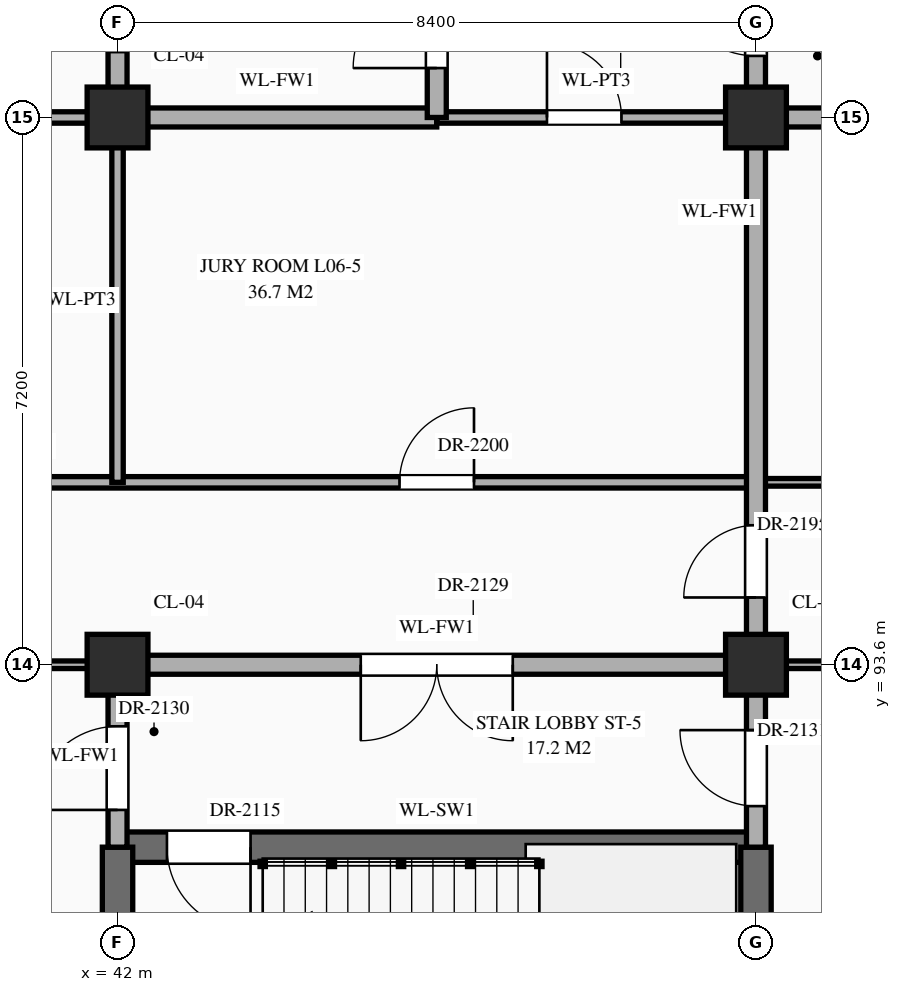
"""IFC4 building model, lengths in metres.
Left out: names, types, materials, properties, quantities, classifications, styles, units other than length and angle.
Written with IfcOpenShell. Run it as: python <this file> out.ifc"""

import sys

from ifc_helpers import new_model, si_unit, direction, frame, frame_2d, origin, origin_2d, place, context, subcontext, project, spatial, rectangle, extrude, element, fill, save


model = new_model("IFC4")
c1 = context("Model", 3, precision=1e-05, world=origin(), true_north=direction((0.0, 1.0)))
c2 = subcontext(c1, "Body", "Model", "MODEL_VIEW")
j1 = project(units=[si_unit("LENGTHUNIT", "METRE"), si_unit("PLANEANGLEUNIT", "RADIAN")], contexts=[c1])
p1 = place(None, origin())
s1 = spatial("IfcSite", under=j1, at=p1, CompositionType="ELEMENT")
p2 = place(p1, origin())
s2 = spatial("IfcBuilding", under=s1, at=p2, CompositionType="ELEMENT")
p3 = place(p2, frame((0.0, 0.0, 26.1)))
s3 = spatial("IfcBuildingStorey", under=s2, at=p3, CompositionType="ELEMENT", Elevation=26.1)
for number, where, z_axis, x_axis in (
    (1, (42.0, 93.6, 0.0), (0.0, 0.0, 1.0), (1.0, 0.0, 0.0)),
    (2, (42.0, 100.8, 0.0), (0.0, 0.0, 1.0), (1.0, 0.0, 0.0)),
    (3, (50.4, 93.6, 0.0), (0.0, 0.0, 1.0), (1.0, 0.0, 0.0)),
    (4, (50.4, 100.8, 0.0), (0.0, 0.0, 1.0), (1.0, 0.0, 0.0)),
):
    element("IfcColumn", number, at=place(p3, frame(where, z_axis=z_axis, x_axis=x_axis)), inside=s3, PredefinedType="COLUMN", context=c2, shape_type="SweptSolid", body=[
        extrude(rectangle(XDim=0.8, YDim=0.8, at=origin_2d()), origin(), (0.0, 0.0, 1.0), 4.5),
    ])
p4 = place(p3, frame((42.0, 91.2, 0.0), z_axis=(0.0, 0.0, 1.0), x_axis=(1.0, 0.0, 0.0)))
e5 = element("IfcWall", 5, at=p4, inside=s3, PredefinedType="SHEAR", context=c2, shape_type="SweptSolid", body=[
    extrude(rectangle(XDim=8.4, YDim=0.4, at=frame_2d((4.2, 0.0))), origin(), (0.0, 0.0, 1.0), 4.24),
])
p5 = place(p4, frame((0.65, 0.0, 0.0)))
e6 = element("IfcOpeningElement", 6, at=p5, cuts=e5, PredefinedType="OPENING", context=c2, shape_type="SweptSolid", body=[
    extrude(rectangle(XDim=1.1, YDim=2.2, at=frame_2d((0.55, 1.1))), frame((0.0, 0.212, 0.0), z_axis=(0.0, -1.0, 0.0), x_axis=(1.0, 0.0, 0.0)), (0.0, 0.0, 1.0), 0.424),
])
p6 = place(p3, frame((25.24, 93.6, 0.0), z_axis=(0.0, 0.0, 1.0), x_axis=(1.0, 0.0, 0.0)))
e7 = element("IfcWall", 7, at=p6, inside=s3, PredefinedType="STANDARD", context=c2, shape_type="SweptSolid", body=[
    extrude(rectangle(XDim=16.76, YDim=0.1, at=frame_2d((8.38, 0.0))), origin(), (0.0, 0.0, 1.0), 3.19),
])
p7 = place(p6, frame((1.01, 0.0, 0.0)))
e8 = element("IfcOpeningElement", 8, at=p7, cuts=e7, PredefinedType="OPENING", context=c2, shape_type="SweptSolid", body=[
    extrude(rectangle(XDim=1.02, YDim=2.4, at=frame_2d((0.51, 1.2))), frame((0.0, 0.062, 0.0), z_axis=(0.0, -1.0, 0.0), x_axis=(1.0, 0.0, 0.0)), (0.0, 0.0, 1.0), 0.124),
])
p8 = place(p6, frame((3.26, 0.0, 0.0)))
e9 = element("IfcOpeningElement", 9, at=p8, cuts=e7, PredefinedType="OPENING", context=c2, shape_type="SweptSolid", body=[
    extrude(rectangle(XDim=1.8, YDim=2.5, at=frame_2d((0.9, 1.25))), frame((0.0, 0.062, 0.0), z_axis=(0.0, -1.0, 0.0), x_axis=(1.0, 0.0, 0.0)), (0.0, 0.0, 1.0), 0.124),
])
p9 = place(p6, frame((6.39, 0.0, 0.0)))
e10 = element("IfcOpeningElement", 10, at=p9, cuts=e7, PredefinedType="OPENING", context=c2, shape_type="SweptSolid", body=[
    extrude(rectangle(XDim=1.14, YDim=2.4, at=frame_2d((0.57, 1.2))), frame((0.0, 0.062, 0.0), z_axis=(0.0, -1.0, 0.0), x_axis=(1.0, 0.0, 0.0)), (0.0, 0.0, 1.0), 0.124),
])
p10 = place(p6, frame((11.95, 0.0, 0.0)))
e11 = element("IfcOpeningElement", 11, at=p10, cuts=e7, PredefinedType="OPENING", context=c2, shape_type="SweptSolid", body=[
    extrude(rectangle(XDim=0.9, YDim=2.15, at=frame_2d((0.45, 1.075))), frame((0.0, 0.062, 0.0), z_axis=(0.0, -1.0, 0.0), x_axis=(1.0, 0.0, 0.0)), (0.0, 0.0, 1.0), 0.124),
])
p11 = place(p3, frame((42.0, 93.6, 0.0), z_axis=(0.0, 0.0, 1.0), x_axis=(1.0, 0.0, 0.0)))
e12 = element("IfcWall", 12, at=p11, inside=s3, PredefinedType="STANDARD", context=c2, shape_type="SweptSolid", body=[
    extrude(rectangle(XDim=8.4, YDim=0.25, at=frame_2d((4.2, 0.0))), origin(), (0.0, 0.0, 1.0), 3.39),
])
p12 = place(p11, frame((3.2, 0.0, 0.0)))
e13 = element("IfcOpeningElement", 13, at=p12, cuts=e12, PredefinedType="OPENING", context=c2, shape_type="SweptSolid", body=[
    extrude(rectangle(XDim=2.0, YDim=2.4, at=frame_2d((1.0, 1.2))), frame((0.0, 0.137, 0.0), z_axis=(0.0, -1.0, 0.0), x_axis=(1.0, 0.0, 0.0)), (0.0, 0.0, 1.0), 0.274),
])
p13 = place(p3, frame((50.4, 93.6, 0.0), z_axis=(0.0, 0.0, 1.0), x_axis=(1.0, 0.0, 0.0)))
e14 = element("IfcWall", 14, at=p13, inside=s3, PredefinedType="STANDARD", context=c2, shape_type="SweptSolid", body=[
    extrude(rectangle(XDim=8.4, YDim=0.1, at=frame_2d((4.2, 0.0))), origin(), (0.0, 0.0, 1.0), 3.39),
])
p14 = place(p13, frame((0.98, 0.0, 0.0)))
e15 = element("IfcOpeningElement", 15, at=p14, cuts=e14, PredefinedType="OPENING", context=c2, shape_type="SweptSolid", body=[
    extrude(rectangle(XDim=1.16, YDim=2.3, at=frame_2d((0.58, 1.15))), frame((0.0, 0.062, 0.0), z_axis=(0.0, -1.0, 0.0), x_axis=(1.0, 0.0, 0.0)), (0.0, 0.0, 1.0), 0.124),
])
p15 = place(p13, frame((3.6, 0.0, 0.0)))
e16 = element("IfcOpeningElement", 16, at=p15, cuts=e14, PredefinedType="OPENING", context=c2, shape_type="SweptSolid", body=[
    extrude(rectangle(XDim=1.2, YDim=2.35, at=frame_2d((0.6, 1.175))), frame((0.0, 0.062, 0.0), z_axis=(0.0, -1.0, 0.0), x_axis=(1.0, 0.0, 0.0)), (0.0, 0.0, 1.0), 0.124),
])
p16 = place(p13, frame((6.22, 0.0, 0.0)))
e17 = element("IfcOpeningElement", 17, at=p16, cuts=e14, PredefinedType="OPENING", context=c2, shape_type="SweptSolid", body=[
    extrude(rectangle(XDim=1.24, YDim=2.3, at=frame_2d((0.62, 1.15))), frame((0.0, 0.062, 0.0), z_axis=(0.0, -1.0, 0.0), x_axis=(1.0, 0.0, 0.0)), (0.0, 0.0, 1.0), 0.124),
])
p17 = place(p3, frame((31.0, 96.0, 0.0), z_axis=(0.0, 0.0, 1.0), x_axis=(1.0, 0.0, 0.0)))
e18 = element("IfcWall", 18, at=p17, inside=s3, PredefinedType="STANDARD", context=c2, shape_type="SweptSolid", body=[
    extrude(rectangle(XDim=19.4, YDim=0.15, at=frame_2d((9.7, 0.0))), origin(), (0.0, 0.0, 1.0), 4.24),
])
p18 = place(p17, frame((0.66, 0.0, 0.0)))
e19 = element("IfcOpeningElement", 19, at=p18, cuts=e18, PredefinedType="OPENING", context=c2, shape_type="SweptSolid", body=[
    extrude(rectangle(XDim=1.28, YDim=2.35, at=frame_2d((0.64, 1.175))), frame((0.0, 0.087, 0.0), z_axis=(0.0, -1.0, 0.0), x_axis=(1.0, 0.0, 0.0)), (0.0, 0.0, 1.0), 0.174),
])
p19 = place(p17, frame((6.33, 0.0, 0.0)))
e20 = element("IfcOpeningElement", 20, at=p19, cuts=e18, PredefinedType="OPENING", context=c2, shape_type="SweptSolid", body=[
    extrude(rectangle(XDim=0.94, YDim=2.3, at=frame_2d((0.47, 1.15))), frame((0.0, 0.087, 0.0), z_axis=(0.0, -1.0, 0.0), x_axis=(1.0, 0.0, 0.0)), (0.0, 0.0, 1.0), 0.174),
])
p20 = place(p17, frame((14.71, 0.0, 0.0)))
e21 = element("IfcOpeningElement", 21, at=p20, cuts=e18, PredefinedType="OPENING", context=c2, shape_type="SweptSolid", body=[
    extrude(rectangle(XDim=0.98, YDim=2.35, at=frame_2d((0.49, 1.175))), frame((0.0, 0.087, 0.0), z_axis=(0.0, -1.0, 0.0), x_axis=(1.0, 0.0, 0.0)), (0.0, 0.0, 1.0), 0.174),
])
p21 = place(p3, frame((50.4, 96.0, 0.0), z_axis=(0.0, 0.0, 1.0), x_axis=(1.0, 0.0, 0.0)))
e22 = element("IfcWall", 22, at=p21, inside=s3, PredefinedType="STANDARD", context=c2, shape_type="SweptSolid", body=[
    extrude(rectangle(XDim=5.8, YDim=0.1, at=frame_2d((2.9, 0.0))), origin(), (0.0, 0.0, 1.0), 4.24),
])
p22 = place(p21, frame((1.24, 0.0, 0.0)))
e23 = element("IfcOpeningElement", 23, at=p22, cuts=e22, PredefinedType="OPENING", context=c2, shape_type="SweptSolid", body=[
    extrude(rectangle(XDim=0.92, YDim=2.15, at=frame_2d((0.46, 1.075))), frame((0.0, 0.062, 0.0), z_axis=(0.0, -1.0, 0.0), x_axis=(1.0, 0.0, 0.0)), (0.0, 0.0, 1.0), 0.124),
])
p23 = place(p21, frame((4.12, 0.0, 0.0)))
e24 = element("IfcOpeningElement", 24, at=p23, cuts=e22, PredefinedType="OPENING", context=c2, shape_type="SweptSolid", body=[
    extrude(rectangle(XDim=0.96, YDim=2.2, at=frame_2d((0.48, 1.1))), frame((0.0, 0.062, 0.0), z_axis=(0.0, -1.0, 0.0), x_axis=(1.0, 0.0, 0.0)), (0.0, 0.0, 1.0), 0.124),
])
p24 = place(p3, frame((31.0, 100.8, 0.0), z_axis=(0.0, 0.0, 1.0), x_axis=(1.0, 0.0, 0.0)))
e25 = element("IfcWall", 25, at=p24, inside=s3, PredefinedType="STANDARD", context=c2, shape_type="SweptSolid", body=[
    extrude(rectangle(XDim=11.0, YDim=0.15, at=frame_2d((5.5, 0.0))), origin(), (0.0, 0.0, 1.0), 3.39),
])
p25 = place(p24, frame((0.67, 0.0, 0.0)))
e26 = element("IfcOpeningElement", 26, at=p25, cuts=e25, PredefinedType="OPENING", context=c2, shape_type="SweptSolid", body=[
    extrude(rectangle(XDim=0.94, YDim=2.3, at=frame_2d((0.47, 1.15))), frame((0.0, 0.087, 0.0), z_axis=(0.0, -1.0, 0.0), x_axis=(1.0, 0.0, 0.0)), (0.0, 0.0, 1.0), 0.174),
])
p26 = place(p24, frame((6.31, 0.0, 0.0)))
e27 = element("IfcOpeningElement", 27, at=p26, cuts=e25, PredefinedType="OPENING", context=c2, shape_type="SweptSolid", body=[
    extrude(rectangle(XDim=0.98, YDim=2.35, at=frame_2d((0.49, 1.175))), frame((0.0, 0.087, 0.0), z_axis=(0.0, -1.0, 0.0), x_axis=(1.0, 0.0, 0.0)), (0.0, 0.0, 1.0), 0.174),
])
p27 = place(p3, frame((42.0, 100.8, 0.0), z_axis=(0.0, 0.0, 1.0), x_axis=(1.0, 0.0, 0.0)))
e28 = element("IfcWall", 28, at=p27, inside=s3, PredefinedType="STANDARD", context=c2, shape_type="SweptSolid", body=[
    extrude(rectangle(XDim=4.2, YDim=0.25, at=frame_2d((2.1, 0.0))), origin(), (0.0, 0.0, 1.0), 3.39),
])
p28 = place(p3, frame((46.2, 100.8, 0.0), z_axis=(0.0, 0.0, 1.0), x_axis=(1.0, 0.0, 0.0)))
e29 = element("IfcWall", 29, at=p28, inside=s3, PredefinedType="STANDARD", context=c2, shape_type="SweptSolid", body=[
    extrude(rectangle(XDim=4.2, YDim=0.15, at=frame_2d((2.1, 0.0))), origin(), (0.0, 0.0, 1.0), 3.39),
])
p29 = place(p28, frame((1.45, 0.0, 0.0)))
e30 = element("IfcOpeningElement", 30, at=p29, cuts=e29, PredefinedType="OPENING", context=c2, shape_type="SweptSolid", body=[
    extrude(rectangle(XDim=0.98, YDim=2.35, at=frame_2d((0.49, 1.175))), frame((0.0, 0.087, 0.0), z_axis=(0.0, -1.0, 0.0), x_axis=(1.0, 0.0, 0.0)), (0.0, 0.0, 1.0), 0.174),
])
p30 = place(p3, frame((50.4, 100.8, 0.0), z_axis=(0.0, 0.0, 1.0), x_axis=(1.0, 0.0, 0.0)))
e31 = element("IfcWall", 31, at=p30, inside=s3, PredefinedType="STANDARD", context=c2, shape_type="SweptSolid", body=[
    extrude(rectangle(XDim=3.4, YDim=0.25, at=frame_2d((1.7, 0.0))), origin(), (0.0, 0.0, 1.0), 3.39),
])
p31 = place(p30, frame((1.36, 0.0, 0.0)))
e32 = element("IfcOpeningElement", 32, at=p31, cuts=e31, PredefinedType="OPENING", context=c2, shape_type="SweptSolid", body=[
    extrude(rectangle(XDim=1.0, YDim=2.2, at=frame_2d((0.5, 1.1))), frame((0.0, 0.137, 0.0), z_axis=(0.0, -1.0, 0.0), x_axis=(1.0, 0.0, 0.0)), (0.0, 0.0, 1.0), 0.274),
])
p32 = place(p3, frame((42.0, 86.4, 0.0), z_axis=(0.0, 0.0, 1.0), x_axis=(0.0, 1.0, 0.0)))
e33 = element("IfcWall", 33, at=p32, inside=s3, PredefinedType="SHEAR", context=c2, shape_type="SweptSolid", body=[
    extrude(rectangle(XDim=4.8, YDim=0.4, at=frame_2d((2.4, 0.0))), origin(), (0.0, 0.0, 1.0), 4.24),
])
p33 = place(p3, frame((42.0, 91.2, 0.0), z_axis=(0.0, 0.0, 1.0), x_axis=(0.0, 1.0, 0.0)))
e34 = element("IfcWall", 34, at=p33, inside=s3, PredefinedType="STANDARD", context=c2, shape_type="SweptSolid", body=[
    extrude(rectangle(XDim=2.4, YDim=0.25, at=frame_2d((1.2, 0.0))), origin(), (0.0, 0.0, 1.0), 3.49),
])
p34 = place(p33, frame((0.49, 0.0, 0.0)))
e35 = element("IfcOpeningElement", 35, at=p34, cuts=e34, PredefinedType="OPENING", context=c2, shape_type="SweptSolid", body=[
    extrude(rectangle(XDim=1.1, YDim=2.2, at=frame_2d((0.55, 1.1))), frame((0.0, 0.137, 0.0), z_axis=(0.0, -1.0, 0.0), x_axis=(1.0, 0.0, 0.0)), (0.0, 0.0, 1.0), 0.274),
])
p35 = place(p3, frame((42.0, 96.0, 0.0), z_axis=(0.0, 0.0, 1.0), x_axis=(0.0, 1.0, 0.0)))
e36 = element("IfcWall", 36, at=p35, inside=s3, PredefinedType="STANDARD", context=c2, shape_type="SweptSolid", body=[
    extrude(rectangle(XDim=4.8, YDim=0.15, at=frame_2d((2.4, 0.0))), origin(), (0.0, 0.0, 1.0), 3.49),
])
p36 = place(p3, frame((42.0, 100.8, 0.0), z_axis=(0.0, 0.0, 1.0), x_axis=(0.0, 1.0, 0.0)))
e37 = element("IfcWall", 37, at=p36, inside=s3, PredefinedType="STANDARD", context=c2, shape_type="SweptSolid", body=[
    extrude(rectangle(XDim=3.6, YDim=0.25, at=frame_2d((1.8, 0.0))), origin(), (0.0, 0.0, 1.0), 3.49),
])
p37 = place(p36, frame((0.86, 0.0, 0.0)))
e38 = element("IfcOpeningElement", 38, at=p37, cuts=e37, PredefinedType="OPENING", context=c2, shape_type="SweptSolid", body=[
    extrude(rectangle(XDim=1.0, YDim=2.2, at=frame_2d((0.5, 1.1))), frame((0.0, 0.137, 0.0), z_axis=(0.0, -1.0, 0.0), x_axis=(1.0, 0.0, 0.0)), (0.0, 0.0, 1.0), 0.274),
])
p38 = place(p3, frame((46.2, 100.8, 0.0), z_axis=(0.0, 0.0, 1.0), x_axis=(0.0, 1.0, 0.0)))
e39 = element("IfcWall", 39, at=p38, inside=s3, PredefinedType="STANDARD", context=c2, shape_type="SweptSolid", body=[
    extrude(rectangle(XDim=3.6, YDim=0.25, at=frame_2d((1.8, 0.0))), origin(), (0.0, 0.0, 1.0), 3.89),
])
p39 = place(p38, frame((0.65, 0.0, 0.0)))
e40 = element("IfcOpeningElement", 40, at=p39, cuts=e39, PredefinedType="OPENING", context=c2, shape_type="SweptSolid", body=[
    extrude(rectangle(XDim=1.1, YDim=2.2, at=frame_2d((0.55, 1.1))), frame((0.0, 0.137, 0.0), z_axis=(0.0, -1.0, 0.0), x_axis=(1.0, 0.0, 0.0)), (0.0, 0.0, 1.0), 0.274),
])
p40 = place(p3, frame((50.4, 86.4, 0.0), z_axis=(0.0, 0.0, 1.0), x_axis=(0.0, 1.0, 0.0)))
e41 = element("IfcWall", 41, at=p40, inside=s3, PredefinedType="SHEAR", context=c2, shape_type="SweptSolid", body=[
    extrude(rectangle(XDim=4.8, YDim=0.4, at=frame_2d((2.4, 0.0))), origin(), (0.0, 0.0, 1.0), 4.24),
])
p41 = place(p3, frame((50.4, 91.2, 0.0), z_axis=(0.0, 0.0, 1.0), x_axis=(0.0, 1.0, 0.0)))
e42 = element("IfcWall", 42, at=p41, inside=s3, PredefinedType="STANDARD", context=c2, shape_type="SweptSolid", body=[
    extrude(rectangle(XDim=13.2, YDim=0.25, at=frame_2d((6.6, 0.0))), origin(), (0.0, 0.0, 1.0), 3.49),
])
p42 = place(p41, frame((0.54, 0.0, 0.0)))
e43 = element("IfcOpeningElement", 43, at=p42, cuts=e42, PredefinedType="OPENING", context=c2, shape_type="SweptSolid", body=[
    extrude(rectangle(XDim=1.0, YDim=2.2, at=frame_2d((0.5, 1.1))), frame((0.0, 0.137, 0.0), z_axis=(0.0, -1.0, 0.0), x_axis=(1.0, 0.0, 0.0)), (0.0, 0.0, 1.0), 0.274),
])
p43 = place(p41, frame((10.41, 0.0, 0.0)))
e44 = element("IfcOpeningElement", 44, at=p43, cuts=e42, PredefinedType="OPENING", context=c2, shape_type="SweptSolid", body=[
    extrude(rectangle(XDim=1.1, YDim=2.2, at=frame_2d((0.55, 1.1))), frame((0.0, 0.137, 0.0), z_axis=(0.0, -1.0, 0.0), x_axis=(1.0, 0.0, 0.0)), (0.0, 0.0, 1.0), 0.274),
])
p44 = place(p41, frame((3.285, 0.0, 0.0)))
e45 = element("IfcOpeningElement", 45, at=p44, cuts=e42, PredefinedType="OPENING", context=c2, shape_type="SweptSolid", body=[
    extrude(rectangle(XDim=0.95, YDim=2.15, at=frame_2d((0.475, 1.075))), frame((0.0, 0.137, 0.0), z_axis=(0.0, -1.0, 0.0), x_axis=(1.0, 0.0, 0.0)), (0.0, 0.0, 1.0), 0.274),
])
p45 = place(p5, frame((1.1, 0.0, 0.0), z_axis=(0.0, 0.0, 1.0), x_axis=(-1.0, 0.0, 0.0)))
e46 = element("IfcDoor", 46, at=p45, inside=s3, OperationType="SINGLE_SWING_LEFT", PredefinedType="DOOR", context=c2, shape_type="SweptSolid", body=[
    extrude(rectangle(XDim=1.1, YDim=2.2, at=frame_2d((0.55, 1.1))), frame((0.0, 0.025, 0.0), z_axis=(0.0, -1.0, 0.0), x_axis=(1.0, 0.0, 0.0)), (0.0, 0.0, 1.0), 0.05),
])
fill(e6, e46)
p46 = place(p12, frame((2.0, 0.0, 0.0), z_axis=(0.0, 0.0, 1.0), x_axis=(-1.0, 0.0, 0.0)))
e47 = element("IfcDoor", 47, at=p46, inside=s3, OperationType="DOUBLE_DOOR_SINGLE_SWING", PredefinedType="DOOR", context=c2, shape_type="SweptSolid", body=[
    extrude(rectangle(XDim=2.0, YDim=2.4, at=frame_2d((1.0, 1.2))), frame((0.0, 0.025, 0.0), z_axis=(0.0, -1.0, 0.0), x_axis=(1.0, 0.0, 0.0)), (0.0, 0.0, 1.0), 0.05),
])
fill(e13, e47)
p47 = place(p34, origin())
e48 = element("IfcDoor", 48, at=p47, inside=s3, OperationType="SINGLE_SWING_LEFT", PredefinedType="DOOR", context=c2, shape_type="SweptSolid", body=[
    extrude(rectangle(XDim=1.1, YDim=2.2, at=frame_2d((0.55, 1.1))), frame((0.0, 0.025, 0.0), z_axis=(0.0, -1.0, 0.0), x_axis=(1.0, 0.0, 0.0)), (0.0, 0.0, 1.0), 0.05),
])
fill(e35, e48)
p48 = place(p42, origin())
e49 = element("IfcDoor", 49, at=p48, inside=s3, OperationType="SINGLE_SWING_RIGHT", PredefinedType="DOOR", context=c2, shape_type="SweptSolid", body=[
    extrude(rectangle(XDim=1.0, YDim=2.2, at=frame_2d((0.5, 1.1))), frame((0.0, 0.025, 0.0), z_axis=(0.0, -1.0, 0.0), x_axis=(1.0, 0.0, 0.0)), (0.0, 0.0, 1.0), 0.05),
])
fill(e43, e49)
p49 = place(p39, origin())
e50 = element("IfcDoor", 50, at=p49, inside=s3, OperationType="SINGLE_SWING_LEFT", PredefinedType="DOOR", context=c2, shape_type="SweptSolid", body=[
    extrude(rectangle(XDim=1.1, YDim=2.2, at=frame_2d((0.55, 1.1))), frame((0.0, 0.025, 0.0), z_axis=(0.0, -1.0, 0.0), x_axis=(1.0, 0.0, 0.0)), (0.0, 0.0, 1.0), 0.05),
])
fill(e40, e50)
p50 = place(p43, origin())
e51 = element("IfcDoor", 51, at=p50, inside=s3, OperationType="SINGLE_SWING_RIGHT", PredefinedType="DOOR", context=c2, shape_type="SweptSolid", body=[
    extrude(rectangle(XDim=1.1, YDim=2.2, at=frame_2d((0.55, 1.1))), frame((0.0, 0.025, 0.0), z_axis=(0.0, -1.0, 0.0), x_axis=(1.0, 0.0, 0.0)), (0.0, 0.0, 1.0), 0.05),
])
fill(e44, e51)
p51 = place(p29, origin())
e52 = element("IfcDoor", 52, at=p51, inside=s3, OperationType="SINGLE_SWING_LEFT", PredefinedType="DOOR", context=c2, shape_type="SweptSolid", body=[
    extrude(rectangle(XDim=0.98, YDim=2.35, at=frame_2d((0.49, 1.175))), frame((0.0, 0.025, 0.0), z_axis=(0.0, -1.0, 0.0), x_axis=(1.0, 0.0, 0.0)), (0.0, 0.0, 1.0), 0.05),
])
fill(e30, e52)
p52 = place(p44, origin())
e53 = element("IfcDoor", 53, at=p52, inside=s3, OperationType="SINGLE_SWING_LEFT", PredefinedType="DOOR", context=c2, shape_type="SweptSolid", body=[
    extrude(rectangle(XDim=0.95, YDim=2.15, at=frame_2d((0.475, 1.075))), frame((0.0, 0.025, 0.0), z_axis=(0.0, -1.0, 0.0), x_axis=(1.0, 0.0, 0.0)), (0.0, 0.0, 1.0), 0.05),
])
fill(e45, e53)
p53 = place(p20, origin())
e54 = element("IfcDoor", 54, at=p53, inside=s3, OperationType="SINGLE_SWING_RIGHT", PredefinedType="DOOR", context=c2, shape_type="SweptSolid", body=[
    extrude(rectangle(XDim=0.98, YDim=2.35, at=frame_2d((0.49, 1.175))), frame((0.0, 0.025, 0.0), z_axis=(0.0, -1.0, 0.0), x_axis=(1.0, 0.0, 0.0)), (0.0, 0.0, 1.0), 0.05),
])
fill(e21, e54)
save(model, sys.argv[1])
